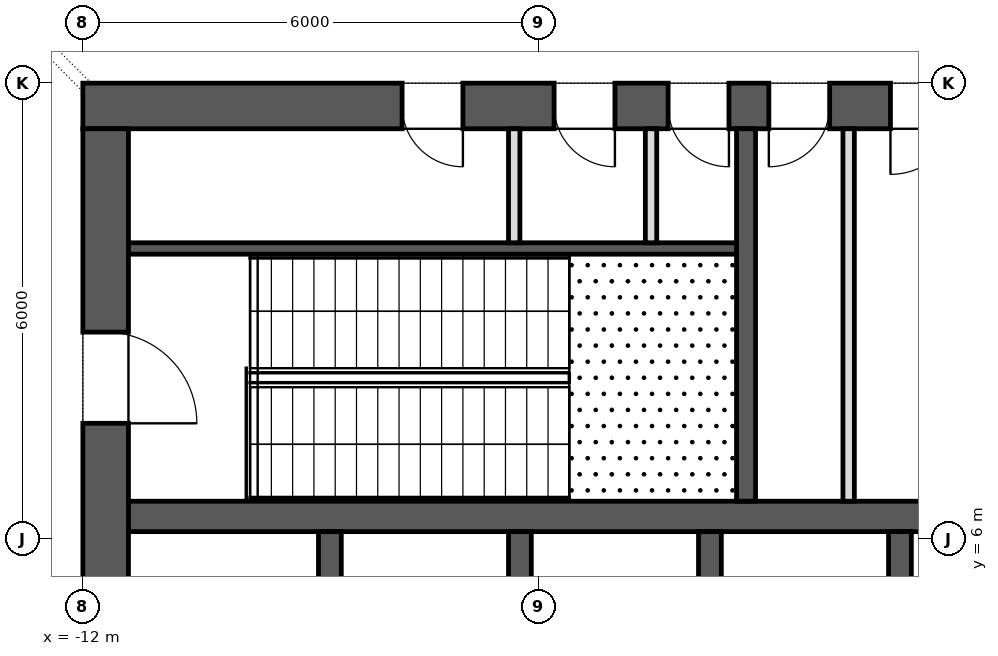
"""IFC4 building model, lengths in metres.
Left out: names, types, materials, properties, quantities, classifications, styles, units other than length and angle.
Written with IfcOpenShell. Run it as: python <this file> out.ifc"""

import sys

from ifc_helpers import new_model, si_unit, direction, frame, frame_2d, origin, place, context, subcontext, project, spatial, rectangle, extrude, element, fill, save


model = new_model("IFC4")
c1 = context("Model", 3, precision=1e-05, world=origin(), true_north=direction((0.0, 1.0)))
c2 = subcontext(c1, "Body", "Model", "MODEL_VIEW")
j1 = project(units=[si_unit("LENGTHUNIT", "METRE"), si_unit("PLANEANGLEUNIT", "RADIAN")], contexts=[c1])
p1 = place(None, origin())
s1 = spatial("IfcSite", under=j1, at=p1, CompositionType="ELEMENT")
p2 = place(p1, origin())
s2 = spatial("IfcBuilding", under=s1, at=p2, CompositionType="ELEMENT")
p3 = place(p2, frame((0.0, 0.0, 18.0)))
s3 = spatial("IfcBuildingStorey", under=s2, at=p3, CompositionType="ELEMENT", Elevation=18.0)
p4 = place(p3, frame((-12.0, 11.7, 0.0), z_axis=(0.0, 0.0, 1.0), x_axis=(1.0, 0.0, 0.0)))
e1 = element("IfcWall", 1, at=p4, inside=s3, PredefinedType="SHEAR", context=c2, shape_type="SweptSolid", body=[
    extrude(rectangle(XDim=24.0, YDim=0.6, at=frame_2d((12.0, 0.0))), origin(), (0.0, 0.0, 1.0), 5.5),
])
p5 = place(p4, frame((9.025, 0.0, 0.0)))
e2 = element("IfcOpeningElement", 2, at=p5, cuts=e1, PredefinedType="OPENING", context=c2, shape_type="SweptSolid", body=[
    extrude(rectangle(XDim=0.8, YDim=2.1, at=frame_2d((0.4, 1.05))), frame((0.0, 0.312, 0.0), z_axis=(0.0, -1.0, 0.0), x_axis=(1.0, 0.0, 0.0)), (0.0, 0.0, 1.0), 0.624),
])
p6 = place(p4, frame((10.625, 0.0, 0.0)))
e3 = element("IfcOpeningElement", 3, at=p6, cuts=e1, PredefinedType="OPENING", context=c2, shape_type="SweptSolid", body=[
    extrude(rectangle(XDim=0.9, YDim=2.1, at=frame_2d((0.45, 1.05))), frame((0.0, 0.312, 0.0), z_axis=(0.0, -1.0, 0.0), x_axis=(1.0, 0.0, 0.0)), (0.0, 0.0, 1.0), 0.624),
])
p7 = place(p4, frame((4.2, 0.0, 0.0)))
e4 = element("IfcOpeningElement", 4, at=p7, cuts=e1, PredefinedType="OPENING", context=c2, shape_type="SweptSolid", body=[
    extrude(rectangle(XDim=0.8, YDim=2.1, at=frame_2d((0.4, 1.05))), frame((0.0, 0.312, 0.0), z_axis=(0.0, -1.0, 0.0), x_axis=(1.0, 0.0, 0.0)), (0.0, 0.0, 1.0), 0.624),
])
p8 = place(p4, frame((6.2, 0.0, 0.0)))
e5 = element("IfcOpeningElement", 5, at=p8, cuts=e1, PredefinedType="OPENING", context=c2, shape_type="SweptSolid", body=[
    extrude(rectangle(XDim=0.8, YDim=2.1, at=frame_2d((0.4, 1.05))), frame((0.0, 0.312, 0.0), z_axis=(0.0, -1.0, 0.0), x_axis=(1.0, 0.0, 0.0)), (0.0, 0.0, 1.0), 0.624),
])
p9 = place(p4, frame((7.7, 0.0, 0.0)))
e6 = element("IfcOpeningElement", 6, at=p9, cuts=e1, PredefinedType="OPENING", context=c2, shape_type="SweptSolid", body=[
    extrude(rectangle(XDim=0.8, YDim=2.1, at=frame_2d((0.4, 1.05))), frame((0.0, 0.312, 0.0), z_axis=(0.0, -1.0, 0.0), x_axis=(1.0, 0.0, 0.0)), (0.0, 0.0, 1.0), 0.624),
])
p10 = place(p4, frame((15.85, 0.0, 0.0)))
e7 = element("IfcOpeningElement", 7, at=p10, cuts=e1, PredefinedType="OPENING", context=c2, shape_type="SweptSolid", body=[
    extrude(rectangle(XDim=0.8, YDim=2.1, at=frame_2d((0.4, 1.05))), frame((0.0, 0.312, 0.0), z_axis=(0.0, -1.0, 0.0), x_axis=(1.0, 0.0, 0.0)), (0.0, 0.0, 1.0), 0.624),
])
p11 = place(p3, frame((-11.7, -11.4, 0.0), z_axis=(0.0, 0.0, 1.0), x_axis=(0.0, 1.0, 0.0)))
e8 = element("IfcWall", 8, at=p11, inside=s3, PredefinedType="SHEAR", context=c2, shape_type="SweptSolid", body=[
    extrude(rectangle(XDim=22.8, YDim=0.6, at=frame_2d((11.4, 0.0))), origin(), (0.0, 0.0, 1.0), 5.5),
])
p12 = place(p11, frame((10.2, 0.0, 0.0)))
e9 = element("IfcOpeningElement", 9, at=p12, cuts=e8, PredefinedType="OPENING", context=c2, shape_type="SweptSolid", body=[
    extrude(rectangle(XDim=2.4, YDim=2.1, at=frame_2d((1.2, 1.05))), frame((0.0, 0.312, 0.0), z_axis=(0.0, -1.0, 0.0), x_axis=(1.0, 0.0, 0.0)), (0.0, 0.0, 1.0), 0.624),
])
p13 = place(p11, frame((18.925, 0.0, 0.0)))
e10 = element("IfcOpeningElement", 10, at=p13, cuts=e8, PredefinedType="OPENING", context=c2, shape_type="SweptSolid", body=[
    extrude(rectangle(XDim=1.2, YDim=2.1, at=frame_2d((0.6, 1.05))), frame((0.0, 0.312, 0.0), z_axis=(0.0, -1.0, 0.0), x_axis=(1.0, 0.0, 0.0)), (0.0, 0.0, 1.0), 0.624),
])
p14 = place(p11, frame((2.675, 0.0, 0.0)))
e11 = element("IfcOpeningElement", 11, at=p14, cuts=e8, PredefinedType="OPENING", context=c2, shape_type="SweptSolid", body=[
    extrude(rectangle(XDim=1.2, YDim=2.1, at=frame_2d((0.6, 1.05))), frame((0.0, 0.312, 0.0), z_axis=(0.0, -1.0, 0.0), x_axis=(1.0, 0.0, 0.0)), (0.0, 0.0, 1.0), 0.624),
])
p15 = place(p3, frame((-11.4, 6.3, 0.0), z_axis=(0.0, 0.0, 1.0), x_axis=(1.0, 0.0, 0.0)))
e12 = element("IfcWall", 12, at=p15, inside=s3, PredefinedType="SHEAR", context=c2, shape_type="SweptSolid", body=[
    extrude(rectangle(XDim=22.8, YDim=0.4, at=frame_2d((11.4, 0.0))), origin(), (0.0, 0.0, 1.0), 5.5),
])
p16 = place(p15, frame((20.85, 0.0, 0.0)))
e13 = element("IfcOpeningElement", 13, at=p16, cuts=e12, PredefinedType="OPENING", context=c2, shape_type="SweptSolid", body=[
    extrude(rectangle(XDim=1.1, YDim=2.1, at=frame_2d((0.55, 1.05))), frame((0.0, 0.212, 0.0), z_axis=(0.0, -1.0, 0.0), x_axis=(1.0, 0.0, 0.0)), (0.0, 0.0, 1.0), 0.424),
])
for number, where, z_axis, x_axis in (
    (14, (-8.75, 3.2, 0.0), (0.0, 0.0, 1.0), (0.0, 1.0, 0.0)),
    (15, (-6.25, 3.2, 0.0), (0.0, 0.0, 1.0), (0.0, 1.0, 0.0)),
    (16, (-3.75, 3.2, 0.0), (0.0, 0.0, 1.0), (0.0, 1.0, 0.0)),
    (17, (-1.25, 3.2, 0.0), (0.0, 0.0, 1.0), (0.0, 1.0, 0.0)),
):
    element("IfcWall", number, at=place(p3, frame(where, z_axis=z_axis, x_axis=x_axis)), inside=s3, PredefinedType="SHEAR", context=c2, shape_type="SweptSolid", body=[
        extrude(rectangle(XDim=2.9, YDim=0.3, at=frame_2d((1.45, 0.0))), origin(), (0.0, 0.0, 1.0), 5.5),
    ])
p17 = place(p3, frame((-3.275, 6.5, 0.0), z_axis=(0.0, 0.0, 1.0), x_axis=(0.0, 1.0, 0.0)))
e18 = element("IfcWall", 18, at=p17, inside=s3, PredefinedType="SHEAR", context=c2, shape_type="SweptSolid", body=[
    extrude(rectangle(XDim=4.9, YDim=0.25, at=frame_2d((2.45, 0.0))), origin(), (0.0, 0.0, 1.0), 5.2),
])
p18 = place(p3, frame((-11.4, 9.825, 0.0), z_axis=(0.0, 0.0, 1.0), x_axis=(1.0, 0.0, 0.0)))
e19 = element("IfcWall", 19, at=p18, inside=s3, PredefinedType="SHEAR", context=c2, shape_type="SweptSolid", body=[
    extrude(rectangle(XDim=8.0, YDim=0.15, at=frame_2d((4.0, 0.0))), origin(), (0.0, 0.0, 1.0), 5.2),
])
p19 = place(p3, frame((-1.925, 6.5, 0.0), z_axis=(0.0, 0.0, 1.0), x_axis=(0.0, 1.0, 0.0)))
e20 = element("IfcWall", 20, at=p19, inside=s3, PredefinedType="PARTITIONING", context=c2, shape_type="SweptSolid", body=[
    extrude(rectangle(XDim=4.9, YDim=0.15, at=frame_2d((2.45, 0.0))), origin(), (0.0, 0.0, 1.0), 5.2),
])
for number, where, z_axis, x_axis in (
    (21, (-6.325, 9.9, 0.0), (0.0, 0.0, 1.0), (0.0, 1.0, 0.0)),
    (22, (-4.525, 9.9, 0.0), (0.0, 0.0, 1.0), (0.0, 1.0, 0.0)),
):
    element("IfcWall", number, at=place(p3, frame(where, z_axis=z_axis, x_axis=x_axis)), inside=s3, PredefinedType="PARTITIONING", context=c2, shape_type="SweptSolid", body=[
        extrude(rectangle(XDim=1.5, YDim=0.15, at=frame_2d((0.75, 0.0))), origin(), (0.0, 0.0, 1.0), 5.2),
    ])
p20 = place(p13, frame((1.2, 0.0, 0.0), z_axis=(0.0, 0.0, 1.0), x_axis=(-1.0, 0.0, 0.0)))
e23 = element("IfcDoor", 23, at=p20, inside=s3, OperationType="SINGLE_SWING_LEFT", PredefinedType="DOOR", context=c2, shape_type="SweptSolid", body=[
    extrude(rectangle(XDim=1.2, YDim=2.1, at=frame_2d((0.6, 1.05))), frame((0.0, 0.025, 0.0), z_axis=(0.0, -1.0, 0.0), x_axis=(1.0, 0.0, 0.0)), (0.0, 0.0, 1.0), 0.05),
])
fill(e10, e23)
p21 = place(p5, frame((0.8, 0.0, 0.0), z_axis=(0.0, 0.0, 1.0), x_axis=(-1.0, 0.0, 0.0)))
e24 = element("IfcDoor", 24, at=p21, inside=s3, OperationType="SINGLE_SWING_LEFT", PredefinedType="DOOR", context=c2, shape_type="SweptSolid", body=[
    extrude(rectangle(XDim=0.8, YDim=2.1, at=frame_2d((0.4, 1.05))), frame((0.0, 0.025, 0.0), z_axis=(0.0, -1.0, 0.0), x_axis=(1.0, 0.0, 0.0)), (0.0, 0.0, 1.0), 0.05),
])
fill(e2, e24)
p22 = place(p6, frame((0.9, 0.0, 0.0), z_axis=(0.0, 0.0, 1.0), x_axis=(-1.0, 0.0, 0.0)))
e25 = element("IfcDoor", 25, at=p22, inside=s3, OperationType="SINGLE_SWING_LEFT", PredefinedType="DOOR", context=c2, shape_type="SweptSolid", body=[
    extrude(rectangle(XDim=0.9, YDim=2.1, at=frame_2d((0.45, 1.05))), frame((0.0, 0.025, 0.0), z_axis=(0.0, -1.0, 0.0), x_axis=(1.0, 0.0, 0.0)), (0.0, 0.0, 1.0), 0.05),
])
fill(e3, e25)
p23 = place(p7, frame((0.8, 0.0, 0.0), z_axis=(0.0, 0.0, 1.0), x_axis=(-1.0, 0.0, 0.0)))
e26 = element("IfcDoor", 26, at=p23, inside=s3, OperationType="SINGLE_SWING_RIGHT", PredefinedType="DOOR", context=c2, shape_type="SweptSolid", body=[
    extrude(rectangle(XDim=0.8, YDim=2.1, at=frame_2d((0.4, 1.05))), frame((0.0, 0.025, 0.0), z_axis=(0.0, -1.0, 0.0), x_axis=(1.0, 0.0, 0.0)), (0.0, 0.0, 1.0), 0.05),
])
fill(e4, e26)
p24 = place(p8, frame((0.8, 0.0, 0.0), z_axis=(0.0, 0.0, 1.0), x_axis=(-1.0, 0.0, 0.0)))
e27 = element("IfcDoor", 27, at=p24, inside=s3, OperationType="SINGLE_SWING_RIGHT", PredefinedType="DOOR", context=c2, shape_type="SweptSolid", body=[
    extrude(rectangle(XDim=0.8, YDim=2.1, at=frame_2d((0.4, 1.05))), frame((0.0, 0.025, 0.0), z_axis=(0.0, -1.0, 0.0), x_axis=(1.0, 0.0, 0.0)), (0.0, 0.0, 1.0), 0.05),
])
fill(e5, e27)
p25 = place(p9, frame((0.8, 0.0, 0.0), z_axis=(0.0, 0.0, 1.0), x_axis=(-1.0, 0.0, 0.0)))
e28 = element("IfcDoor", 28, at=p25, inside=s3, OperationType="SINGLE_SWING_RIGHT", PredefinedType="DOOR", context=c2, shape_type="SweptSolid", body=[
    extrude(rectangle(XDim=0.8, YDim=2.1, at=frame_2d((0.4, 1.05))), frame((0.0, 0.025, 0.0), z_axis=(0.0, -1.0, 0.0), x_axis=(1.0, 0.0, 0.0)), (0.0, 0.0, 1.0), 0.05),
])
fill(e6, e28)
save(model, sys.argv[1])
